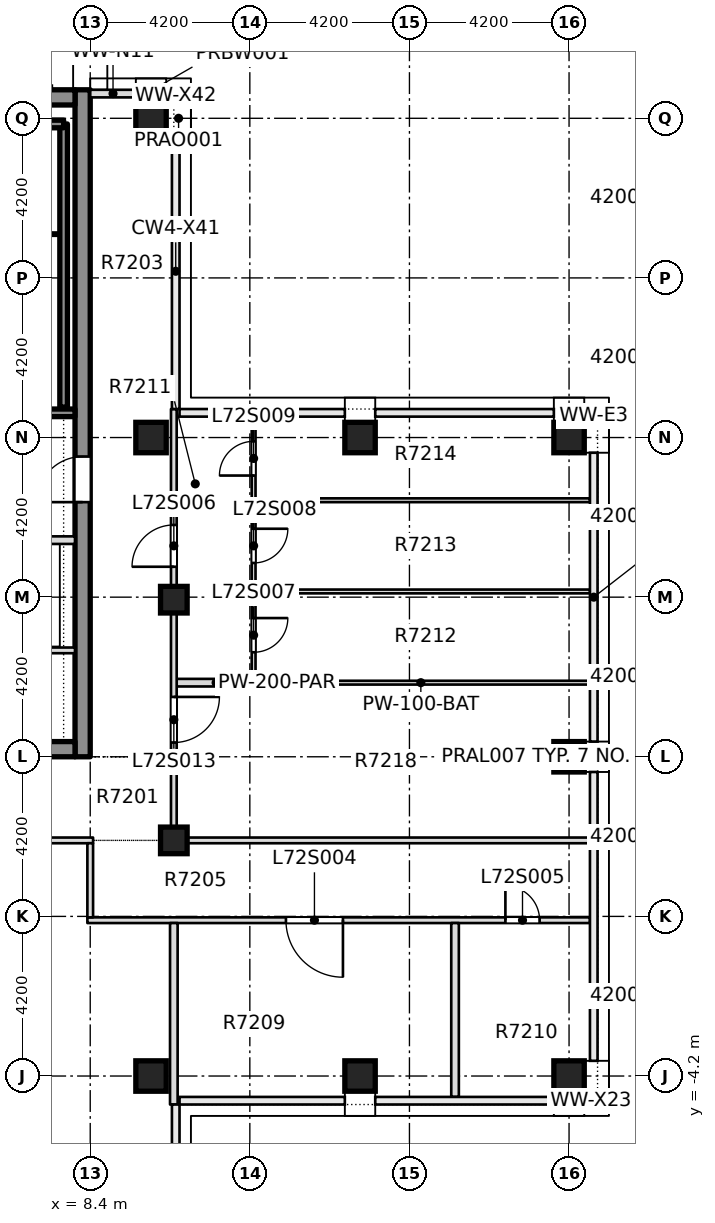
"""IFC4 building model, lengths in metres.
Left out: names, types, materials, properties, quantities, classifications, styles, units other than length and angle.
Written with IfcOpenShell. Run it as: python <this file> out.ifc"""

import sys

from ifc_helpers import new_model, si_unit, direction, frame, frame_2d, origin, origin_2d, place, context, subcontext, project, spatial, rectangle, extrude, element, fill, save


model = new_model("IFC4")
c1 = context("Model", 3, precision=1e-05, world=origin(), true_north=direction((0.0, 1.0)))
c2 = subcontext(c1, "Body", "Model", "MODEL_VIEW")
j1 = project(units=[si_unit("LENGTHUNIT", "METRE"), si_unit("PLANEANGLEUNIT", "RADIAN")], contexts=[c1])
p1 = place(None, origin())
s1 = spatial("IfcSite", under=j1, at=p1, CompositionType="ELEMENT")
p2 = place(p1, origin())
s2 = spatial("IfcBuilding", under=s1, at=p2, CompositionType="ELEMENT")
p3 = place(p2, frame((0.0, 0.0, 273.85)))
s3 = spatial("IfcBuildingStorey", under=s2, at=p3, CompositionType="ELEMENT", Elevation=273.85)
p4 = place(p3, frame((8.2, 4.2, -0.5), z_axis=(0.0, 0.0, 1.0), x_axis=(0.0, 1.0, 0.0)))
e1 = element("IfcWall", 1, at=p4, inside=s3, PredefinedType="SHEAR", context=c2, shape_type="SweptSolid", body=[
    extrude(rectangle(XDim=17.55, YDim=0.4, at=frame_2d((8.775, 0.0))), origin(), (0.0, 0.0, 1.0), 4.5),
])
p5 = place(p4, frame((6.7, 0.0, 0.5)))
e2 = element("IfcOpeningElement", 2, at=p5, cuts=e1, PredefinedType="OPENING", context=c2, shape_type="SweptSolid", body=[
    extrude(rectangle(XDim=1.2, YDim=2.1, at=frame_2d((0.6, 1.05))), frame((0.0, 0.21, 0.0), z_axis=(0.0, -1.0, 0.0), x_axis=(1.0, 0.0, 0.0)), (0.0, 0.0, 1.0), 0.42),
])
for number, where, z_axis, x_axis in (
    (3, (-8.0, 4.4, -0.5), (0.0, 0.0, 1.0), (1.0, 0.0, 0.0)),
    (4, (-8.0, 21.55, -0.5), (0.0, 0.0, 1.0), (1.0, 0.0, 0.0)),
):
    element("IfcWall", number, at=place(p3, frame(where, z_axis=z_axis, x_axis=x_axis)), inside=s3, PredefinedType="SHEAR", context=c2, shape_type="SweptSolid", body=[
        extrude(rectangle(XDim=16.0, YDim=0.4, at=frame_2d((8.0, 0.0))), origin(), (0.0, 0.0, 1.0), 4.5),
    ])
for number, where, z_axis, x_axis in (
    (5, (10.0, -4.2, -0.5), (0.0, 0.0, 1.0), (1.0, 0.0, 0.0)),
    (6, (15.5, -4.2, -0.5), (0.0, 0.0, 1.0), (1.0, 0.0, 0.0)),
    (7, (21.0, -4.2, -0.5), (0.0, 0.0, 1.0), (1.0, 0.0, 0.0)),
    (8, (21.0, 4.2, -0.5), (0.0, 0.0, 1.0), (1.0, 0.0, 0.0)),
    (9, (10.0, 12.6, -0.5), (0.0, 0.0, 1.0), (1.0, 0.0, 0.0)),
    (10, (15.5, 12.6, -0.5), (0.0, 0.0, 1.0), (1.0, 0.0, 0.0)),
    (11, (21.0, 12.6, -0.5), (0.0, 0.0, 1.0), (1.0, 0.0, 0.0)),
    (12, (10.0, 21.0, -0.5), (0.0, 0.0, 1.0), (1.0, 0.0, 0.0)),
):
    element("IfcColumn", number, at=place(p3, frame(where, z_axis=z_axis, x_axis=x_axis)), inside=s3, PredefinedType="COLUMN", context=c2, shape_type="SweptSolid", body=[
        extrude(rectangle(XDim=0.8, YDim=0.8, at=origin_2d()), origin(), (0.0, 0.0, 1.0), 4.5),
    ])
for number, where, z_axis, x_axis in (
    (13, (10.6, 2.0, -0.5), (0.0, 0.0, 1.0), (1.0, 0.0, 0.0)),
    (14, (10.6, 8.333, -0.5), (0.0, 0.0, 1.0), (1.0, 0.0, 0.0)),
):
    element("IfcColumn", number, at=place(p3, frame(where, z_axis=z_axis, x_axis=x_axis)), inside=s3, PredefinedType="COLUMN", context=c2, shape_type="SweptSolid", body=[
        extrude(rectangle(XDim=0.7, YDim=0.7, at=origin_2d()), origin(), (0.0, 0.0, 1.0), 5.0),
    ])
p6 = place(p3, frame((8.325, -0.1, 0.0), z_axis=(0.0, 0.0, 1.0), x_axis=(1.0, 0.0, 0.0)))
e15 = element("IfcWall", 15, at=p6, inside=s3, PredefinedType="PARTITIONING", context=c2, shape_type="SweptSolid", body=[
    extrude(rectangle(XDim=13.225, YDim=0.15, at=frame_2d((6.613, 0.0))), origin(), (0.0, 0.0, 1.0), 4.0),
])
p7 = place(p6, frame((5.225, 0.0, 0.0)))
e16 = element("IfcOpeningElement", 16, at=p7, cuts=e15, PredefinedType="OPENING", context=c2, shape_type="SweptSolid", body=[
    extrude(rectangle(XDim=1.5, YDim=2.1, at=frame_2d((0.75, 1.05))), frame((0.0, 0.085, 0.0), z_axis=(0.0, -1.0, 0.0), x_axis=(1.0, 0.0, 0.0)), (0.0, 0.0, 1.0), 0.17),
])
p8 = place(p6, frame((11.0, 0.0, 0.0)))
e17 = element("IfcOpeningElement", 17, at=p8, cuts=e15, PredefinedType="OPENING", context=c2, shape_type="SweptSolid", body=[
    extrude(rectangle(XDim=0.9, YDim=2.1, at=frame_2d((0.45, 1.05))), frame((0.0, 0.085, 0.0), z_axis=(0.0, -1.0, 0.0), x_axis=(1.0, 0.0, 0.0)), (0.0, 0.0, 1.0), 0.17),
])
p9 = place(p3, frame((-8.475, 2.0, 0.0), z_axis=(0.0, 0.0, 1.0), x_axis=(1.0, 0.0, 0.0)))
e18 = element("IfcWall", 18, at=p9, inside=s3, PredefinedType="PARTITIONING", context=c2, shape_type="SweptSolid", body=[
    extrude(rectangle(XDim=16.95, YDim=0.15, at=frame_2d((8.475, 0.0))), origin(), (0.0, 0.0, 1.0), 4.0),
])
p10 = place(p9, frame((7.725, 0.0, 0.0)))
e19 = element("IfcOpeningElement", 19, at=p10, cuts=e18, PredefinedType="OPENING", context=c2, shape_type="SweptSolid", body=[
    extrude(rectangle(XDim=1.5, YDim=2.1, at=frame_2d((0.75, 1.05))), frame((0.0, 0.085, 0.0), z_axis=(0.0, -1.0, 0.0), x_axis=(1.0, 0.0, 0.0)), (0.0, 0.0, 1.0), 0.17),
])
p11 = place(p3, frame((10.525, 2.0, 0.0), z_axis=(0.0, 0.0, 1.0), x_axis=(1.0, 0.0, 0.0)))
e20 = element("IfcWall", 20, at=p11, inside=s3, PredefinedType="PARTITIONING", context=c2, shape_type="SweptSolid", body=[
    extrude(rectangle(XDim=11.025, YDim=0.15, at=frame_2d((5.513, 0.0))), origin(), (0.0, 0.0, 1.0), 4.0),
])
p12 = place(p3, frame((10.675, 6.15, 0.0), z_axis=(0.0, 0.0, 1.0), x_axis=(1.0, 0.0, 0.0)))
e21 = element("IfcWall", 21, at=p12, inside=s3, PredefinedType="PARTITIONING", context=c2, shape_type="SweptSolid", body=[
    extrude(rectangle(XDim=2.075, YDim=0.2, at=frame_2d((1.038, 0.0))), origin(), (0.0, 0.0, 1.0), 4.0),
])
p13 = place(p3, frame((12.65, 6.15, 0.0), z_axis=(0.0, 0.0, 1.0), x_axis=(1.0, 0.0, 0.0)))
e22 = element("IfcWall", 22, at=p13, inside=s3, PredefinedType="PARTITIONING", context=c2, shape_type="SweptSolid", body=[
    extrude(rectangle(XDim=8.9, YDim=0.1, at=frame_2d((4.45, 0.0))), origin(), (0.0, 0.0, 1.0), 4.0),
])
for number, where, z_axis, x_axis in (
    (23, (12.75, 8.55, 0.0), (0.0, 0.0, 1.0), (1.0, 0.0, 0.0)),
    (24, (12.75, 10.95, 0.0), (0.0, 0.0, 1.0), (1.0, 0.0, 0.0)),
):
    element("IfcWall", number, at=place(p3, frame(where, z_axis=z_axis, x_axis=x_axis)), inside=s3, PredefinedType="PARTITIONING", context=c2, shape_type="SweptSolid", body=[
        extrude(rectangle(XDim=8.8, YDim=0.1, at=frame_2d((4.4, 0.0))), origin(), (0.0, 0.0, 1.0), 4.0),
    ])
p14 = place(p3, frame((8.4, -0.025, 0.0), z_axis=(0.0, 0.0, 1.0), x_axis=(0.0, 1.0, 0.0)))
e25 = element("IfcWall", 25, at=p14, inside=s3, PredefinedType="PARTITIONING", context=c2, shape_type="SweptSolid", body=[
    extrude(rectangle(XDim=1.95, YDim=0.15, at=frame_2d((0.975, 0.0))), origin(), (0.0, 0.0, 1.0), 4.0),
])
p15 = place(p3, frame((10.6, -4.95, 0.0), z_axis=(0.0, 0.0, 1.0), x_axis=(0.0, 1.0, 0.0)))
e26 = element("IfcWall", 26, at=p15, inside=s3, PredefinedType="PARTITIONING", context=c2, shape_type="SweptSolid", body=[
    extrude(rectangle(XDim=4.775, YDim=0.2, at=frame_2d((2.387, 0.0))), origin(), (0.0, 0.0, 1.0), 4.0),
])
p16 = place(p3, frame((10.6, 2.075, 0.0), z_axis=(0.0, 0.0, 1.0), x_axis=(0.0, 1.0, 0.0)))
e27 = element("IfcWall", 27, at=p16, inside=s3, PredefinedType="PARTITIONING", context=c2, shape_type="SweptSolid", body=[
    extrude(rectangle(XDim=11.275, YDim=0.15, at=frame_2d((5.638, 0.0))), origin(), (0.0, 0.0, 1.0), 4.0),
])
p17 = place(p16, frame((7.125, 0.0, 0.0)))
e28 = element("IfcOpeningElement", 28, at=p17, cuts=e27, PredefinedType="OPENING", context=c2, shape_type="SweptSolid", body=[
    extrude(rectangle(XDim=1.1, YDim=2.1, at=frame_2d((0.55, 1.05))), frame((0.0, 0.085, 0.0), z_axis=(0.0, -1.0, 0.0), x_axis=(1.0, 0.0, 0.0)), (0.0, 0.0, 1.0), 0.17),
])
p18 = place(p16, frame((2.5, 0.0, 0.0)))
e29 = element("IfcOpeningElement", 29, at=p18, cuts=e27, PredefinedType="OPENING", context=c2, shape_type="SweptSolid", body=[
    extrude(rectangle(XDim=1.2, YDim=2.1, at=frame_2d((0.6, 1.05))), frame((0.0, 0.085, 0.0), z_axis=(0.0, -1.0, 0.0), x_axis=(1.0, 0.0, 0.0)), (0.0, 0.0, 1.0), 0.17),
])
p19 = place(p3, frame((12.7, 6.25, 0.0), z_axis=(0.0, 0.0, 1.0), x_axis=(0.0, 1.0, 0.0)))
e30 = element("IfcWall", 30, at=p19, inside=s3, PredefinedType="PARTITIONING", context=c2, shape_type="SweptSolid", body=[
    extrude(rectangle(XDim=6.9, YDim=0.1, at=frame_2d((3.45, 0.0))), origin(), (0.0, 0.0, 1.0), 4.0),
])
p20 = place(p19, frame((0.7, 0.0, 0.0)))
e31 = element("IfcOpeningElement", 31, at=p20, cuts=e30, PredefinedType="OPENING", context=c2, shape_type="SweptSolid", body=[
    extrude(rectangle(XDim=0.9, YDim=2.1, at=frame_2d((0.45, 1.05))), frame((0.0, 0.06, 0.0), z_axis=(0.0, -1.0, 0.0), x_axis=(1.0, 0.0, 0.0)), (0.0, 0.0, 1.0), 0.12),
])
p21 = place(p19, frame((3.05, 0.0, 0.0)))
e32 = element("IfcOpeningElement", 32, at=p21, cuts=e30, PredefinedType="OPENING", context=c2, shape_type="SweptSolid", body=[
    extrude(rectangle(XDim=0.9, YDim=2.1, at=frame_2d((0.45, 1.05))), frame((0.0, 0.06, 0.0), z_axis=(0.0, -1.0, 0.0), x_axis=(1.0, 0.0, 0.0)), (0.0, 0.0, 1.0), 0.12),
])
p22 = place(p19, frame((5.35, 0.0, 0.0)))
e33 = element("IfcOpeningElement", 33, at=p22, cuts=e30, PredefinedType="OPENING", context=c2, shape_type="SweptSolid", body=[
    extrude(rectangle(XDim=0.9, YDim=2.1, at=frame_2d((0.45, 1.05))), frame((0.0, 0.06, 0.0), z_axis=(0.0, -1.0, 0.0), x_axis=(1.0, 0.0, 0.0)), (0.0, 0.0, 1.0), 0.12),
])
p23 = place(p3, frame((18.0, -4.75, 0.0), z_axis=(0.0, 0.0, 1.0), x_axis=(0.0, 1.0, 0.0)))
e34 = element("IfcWall", 34, at=p23, inside=s3, PredefinedType="PARTITIONING", context=c2, shape_type="SweptSolid", body=[
    extrude(rectangle(XDim=4.575, YDim=0.2, at=frame_2d((2.288, 0.0))), origin(), (0.0, 0.0, 1.0), 4.0),
])
for number, where, z_axis, x_axis in (
    (35, (21.4, -4.85, 0.0), (0.0, 0.0, 1.0), (1.0, 0.0, 0.0)),
    (36, (21.65, 13.0, 0.0), (0.0, 0.0, 1.0), (0.0, 1.0, 0.0)),
    (37, (10.65, 21.4, 0.0), (0.0, 0.0, 1.0), (0.0, 1.0, 0.0)),
):
    element("IfcWall", number, at=place(p3, frame(where, z_axis=z_axis, x_axis=x_axis)), inside=s3, PredefinedType="STANDARD", context=c2, shape_type="SweptSolid", body=[
        extrude(rectangle(XDim=0.35, YDim=0.2, at=frame_2d((0.175, 0.0))), origin(), (0.0, 0.0, 1.0), 4.0),
    ])
p24 = place(p3, frame((9.6, 21.65, 0.0), z_axis=(0.0, 0.0, 1.0), x_axis=(-1.0, 0.0, 0.0)))
e38 = element("IfcWall", 38, at=p24, inside=s3, PredefinedType="STANDARD", context=c2, shape_type="SweptSolid", body=[
    extrude(rectangle(XDim=1.2, YDim=0.2, at=frame_2d((0.6, 0.0))), origin(), (0.0, 0.0, 1.0), 4.0),
])
p25 = place(p3, frame((-7.999, 7.0, 0.0), z_axis=(0.0, 0.0, 1.0), x_axis=(1.0, 0.0, 0.0)))
e39 = element("IfcWall", 39, at=p25, inside=s3, PredefinedType="PARTITIONING", context=c2, shape_type="SweptSolid", body=[
    extrude(rectangle(XDim=15.998, YDim=0.15, at=frame_2d((7.999, 0.0))), origin(), (0.0, 0.0, 1.0), 4.0),
])
p26 = place(p25, frame((7.299, 0.0, 0.0)))
e40 = element("IfcOpeningElement", 40, at=p26, cuts=e39, PredefinedType="OPENING", context=c2, shape_type="SweptSolid", body=[
    extrude(rectangle(XDim=1.4, YDim=2.1, at=frame_2d((0.7, 1.05))), frame((0.0, 0.085, 0.0), z_axis=(0.0, -1.0, 0.0), x_axis=(1.0, 0.0, 0.0)), (0.0, 0.0, 1.0), 0.17),
])
p27 = place(p3, frame((3.6, 9.9, 0.0), z_axis=(0.0, 0.0, 1.0), x_axis=(1.0, 0.0, 0.0)))
e41 = element("IfcWall", 41, at=p27, inside=s3, PredefinedType="PARTITIONING", context=c2, shape_type="SweptSolid", body=[
    extrude(rectangle(XDim=4.399, YDim=0.2, at=frame_2d((2.199, 0.0))), origin(), (0.0, 0.0, 1.0), 4.0),
])
p28 = place(p27, frame((2.25, 0.0, 0.0)))
e42 = element("IfcOpeningElement", 42, at=p28, cuts=e41, PredefinedType="OPENING", context=c2, shape_type="SweptSolid", body=[
    extrude(rectangle(XDim=1.1, YDim=2.1, at=frame_2d((0.55, 1.05))), frame((0.0, 0.11, 0.0), z_axis=(0.0, -1.0, 0.0), x_axis=(1.0, 0.0, 0.0)), (0.0, 0.0, 1.0), 0.22),
])
p29 = place(p3, frame((3.425, 13.25, 0.0), z_axis=(0.0, 0.0, 1.0), x_axis=(1.0, 0.0, 0.0)))
e43 = element("IfcWall", 43, at=p29, inside=s3, PredefinedType="SOLIDWALL", context=c2, shape_type="SweptSolid", body=[
    extrude(rectangle(XDim=4.574, YDim=0.2, at=frame_2d((2.287, 0.0))), origin(), (0.0, 0.0, 1.0), 4.0),
])
p30 = place(p29, frame((1.825, 0.0, 0.0)))
e44 = element("IfcOpeningElement", 44, at=p30, cuts=e43, PredefinedType="OPENING", context=c2, shape_type="SweptSolid", body=[
    extrude(rectangle(XDim=1.2, YDim=2.1, at=frame_2d((0.6, 1.05))), frame((0.0, 0.11, 0.0), z_axis=(0.0, -1.0, 0.0), x_axis=(1.0, 0.0, 0.0)), (0.0, 0.0, 1.0), 0.22),
])
p31 = place(p3, frame((7.7, 13.4, 0.0), z_axis=(0.0, 0.0, 1.0), x_axis=(0.0, 1.0, 0.0)))
e45 = element("IfcWall", 45, at=p31, inside=s3, PredefinedType="SOLIDWALL", context=c2, shape_type="SweptSolid", body=[
    extrude(rectangle(XDim=7.45, YDim=0.2, at=frame_2d((3.725, 0.0))), origin(), (0.0, 0.0, 1.0), 4.0),
])
p32 = place(p3, frame((4.1, 20.85, 0.0), z_axis=(0.0, 0.0, 1.0), x_axis=(1.0, 0.0, 0.0)))
e46 = element("IfcWall", 46, at=p32, inside=s3, PredefinedType="SOLIDWALL", context=c2, shape_type="SweptSolid", body=[
    extrude(rectangle(XDim=3.6, YDim=0.2, at=frame_2d((1.8, 0.0))), origin(), (0.0, 0.0, 1.0), 4.0),
])
p33 = place(p7, origin())
e47 = element("IfcDoor", 47, at=p33, inside=s3, OperationType="DOUBLE_DOOR_SINGLE_SWING", PredefinedType="DOOR", context=c2, shape_type="SweptSolid", body=[
    extrude(rectangle(XDim=1.5, YDim=2.1, at=frame_2d((0.75, 1.05))), frame((0.0, 0.025, 0.0), z_axis=(0.0, -1.0, 0.0), x_axis=(1.0, 0.0, 0.0)), (0.0, 0.0, 1.0), 0.05),
])
fill(e16, e47)
p34 = place(p8, origin())
e48 = element("IfcDoor", 48, at=p34, inside=s3, OperationType="SINGLE_SWING_LEFT", PredefinedType="DOOR", context=c2, shape_type="SweptSolid", body=[
    extrude(rectangle(XDim=0.9, YDim=2.1, at=frame_2d((0.45, 1.05))), frame((0.0, 0.025, 0.0), z_axis=(0.0, -1.0, 0.0), x_axis=(1.0, 0.0, 0.0)), (0.0, 0.0, 1.0), 0.05),
])
fill(e17, e48)
p35 = place(p17, origin())
e49 = element("IfcDoor", 49, at=p35, inside=s3, OperationType="SINGLE_SWING_RIGHT", PredefinedType="DOOR", context=c2, shape_type="SweptSolid", body=[
    extrude(rectangle(XDim=1.1, YDim=2.1, at=frame_2d((0.55, 1.05))), frame((0.0, 0.025, 0.0), z_axis=(0.0, -1.0, 0.0), x_axis=(1.0, 0.0, 0.0)), (0.0, 0.0, 1.0), 0.05),
])
fill(e28, e49)
p36 = place(p20, origin())
e50 = element("IfcDoor", 50, at=p36, inside=s3, OperationType="SINGLE_SWING_RIGHT", PredefinedType="DOOR", context=c2, shape_type="SweptSolid", body=[
    extrude(rectangle(XDim=0.9, YDim=2.1, at=frame_2d((0.45, 1.05))), frame((0.0, 0.025, 0.0), z_axis=(0.0, -1.0, 0.0), x_axis=(1.0, 0.0, 0.0)), (0.0, 0.0, 1.0), 0.05),
])
fill(e31, e50)
p37 = place(p21, origin())
e51 = element("IfcDoor", 51, at=p37, inside=s3, OperationType="SINGLE_SWING_RIGHT", PredefinedType="DOOR", context=c2, shape_type="SweptSolid", body=[
    extrude(rectangle(XDim=0.9, YDim=2.1, at=frame_2d((0.45, 1.05))), frame((0.0, 0.025, 0.0), z_axis=(0.0, -1.0, 0.0), x_axis=(1.0, 0.0, 0.0)), (0.0, 0.0, 1.0), 0.05),
])
fill(e32, e51)
p38 = place(p22, origin())
e52 = element("IfcDoor", 52, at=p38, inside=s3, OperationType="SINGLE_SWING_LEFT", PredefinedType="DOOR", context=c2, shape_type="SweptSolid", body=[
    extrude(rectangle(XDim=0.9, YDim=2.1, at=frame_2d((0.45, 1.05))), frame((0.0, 0.025, 0.0), z_axis=(0.0, -1.0, 0.0), x_axis=(1.0, 0.0, 0.0)), (0.0, 0.0, 1.0), 0.05),
])
fill(e33, e52)
p39 = place(p18, origin())
e53 = element("IfcDoor", 53, at=p39, inside=s3, OperationType="SINGLE_SWING_LEFT", PredefinedType="DOOR", context=c2, shape_type="SweptSolid", body=[
    extrude(rectangle(XDim=1.2, YDim=2.1, at=frame_2d((0.6, 1.05))), frame((0.0, 0.025, 0.0), z_axis=(0.0, -1.0, 0.0), x_axis=(1.0, 0.0, 0.0)), (0.0, 0.0, 1.0), 0.05),
])
fill(e29, e53)
p40 = place(p5, origin())
e54 = element("IfcDoor", 54, at=p40, inside=s3, OperationType="SINGLE_SWING_LEFT", PredefinedType="DOOR", context=c2, shape_type="SweptSolid", body=[
    extrude(rectangle(XDim=1.2, YDim=2.1, at=frame_2d((0.6, 1.05))), frame((0.0, 0.025, 0.0), z_axis=(0.0, -1.0, 0.0), x_axis=(1.0, 0.0, 0.0)), (0.0, 0.0, 1.0), 0.05),
])
fill(e2, e54)
save(model, sys.argv[1])
